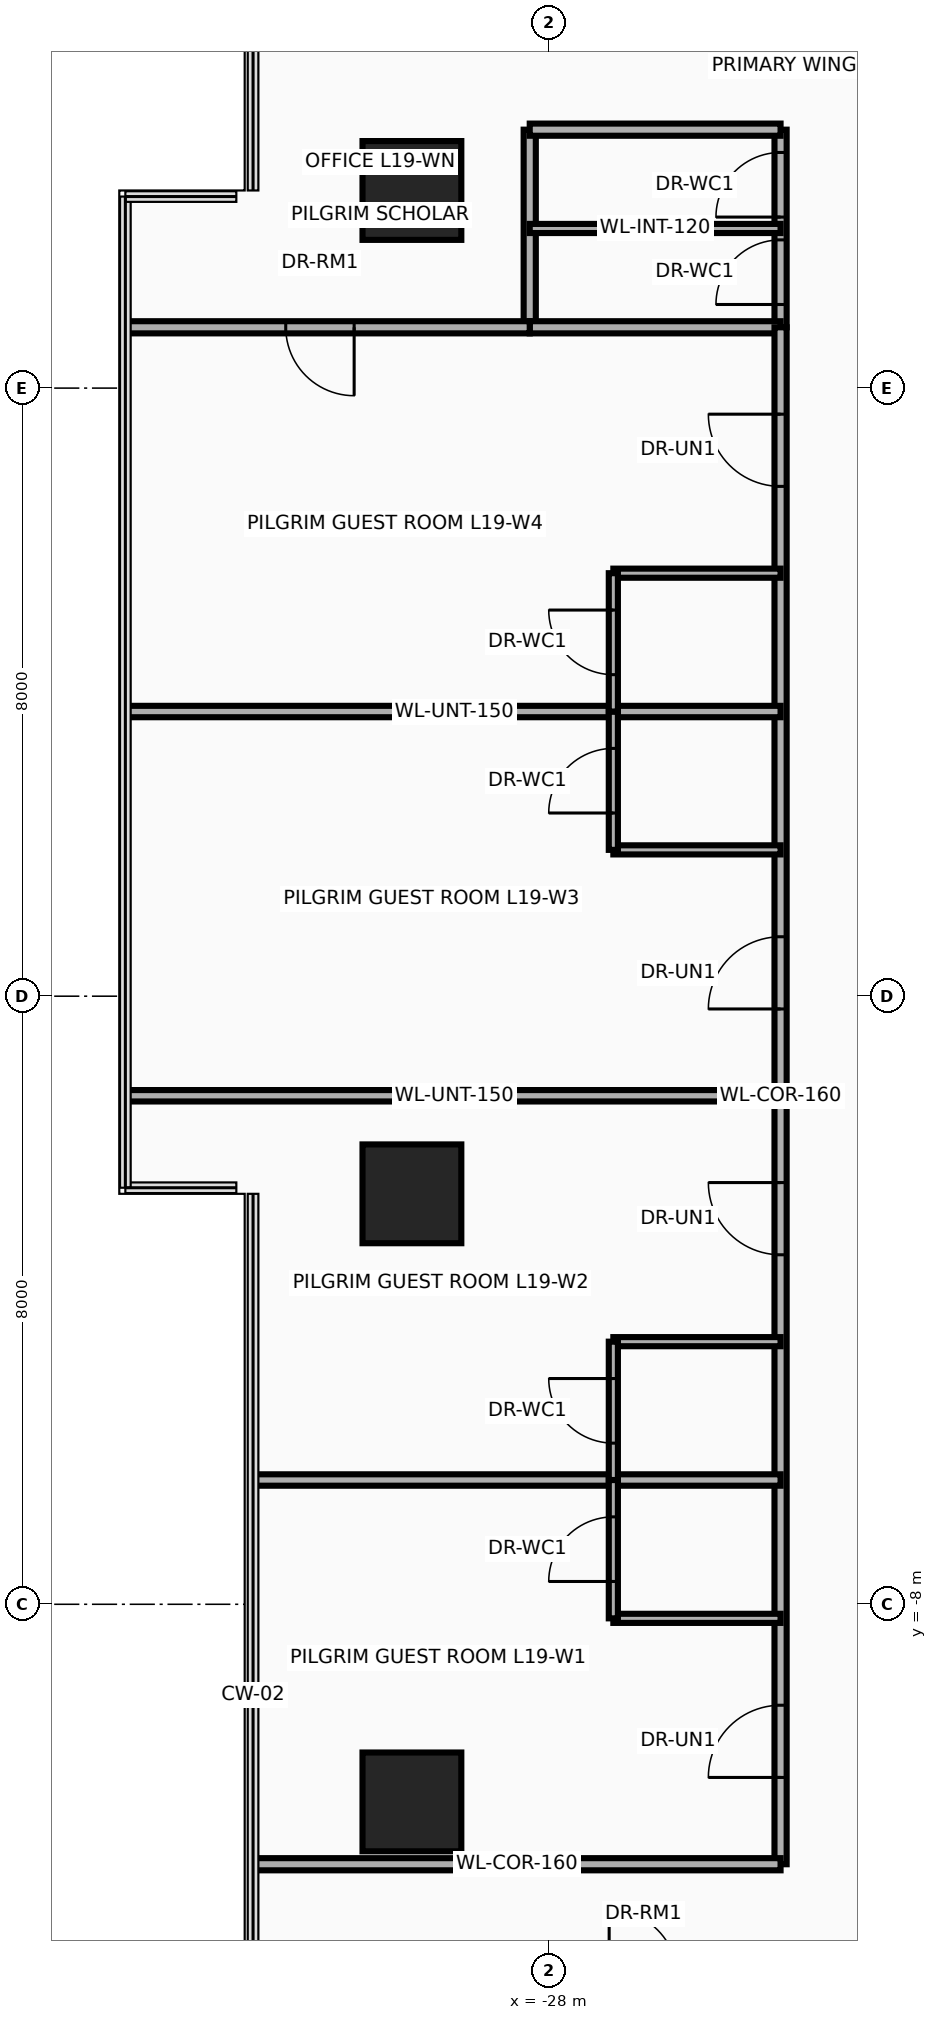
"""IFC4 building model, lengths in metres.
Left out: names, types, materials, properties, quantities, classifications, styles, units other than length and angle.
Written with IfcOpenShell. Run it as: python <this file> out.ifc"""

import sys

from ifc_helpers import new_model, si_unit, direction, frame, frame_2d, origin, origin_2d, place, context, subcontext, project, spatial, rectangle, circle, extrude, source, transform, mapped, element, fill, save


model = new_model("IFC4")
c1 = context("Model", 3, precision=1e-05, world=origin(), true_north=direction((0.0, 1.0)))
c2 = subcontext(c1, "Body", "Model", "MODEL_VIEW")
j1 = project(units=[si_unit("LENGTHUNIT", "METRE"), si_unit("PLANEANGLEUNIT", "RADIAN")], contexts=[c1])
p1 = place(None, origin())
s1 = spatial("IfcSite", under=j1, at=p1, CompositionType="ELEMENT")
p2 = place(p1, origin())
s2 = spatial("IfcBuilding", under=s1, at=p2, CompositionType="ELEMENT")
p3 = place(p2, frame((0.0, 0.0, 77.8)))
s3 = spatial("IfcBuildingStorey", under=s2, at=p3, CompositionType="ELEMENT", Elevation=77.8)
m1 = source(origin(), c2, "Body", "SweptSolid", [
    extrude(circle(Radius=0.65, at=origin_2d()), origin(), (0.0, 0.0, 1.0), 3.7),
])
for number, where, z_axis, x_axis in (
    (1, (-29.8, -10.6, 0.0), (0.0, 0.0, 1.0), (1.0, 0.0, 0.0)),
    (2, (-29.8, -2.6, 0.0), (0.0, 0.0, 1.0), (1.0, 0.0, 0.0)),
    (3, (-29.8, 10.6, 0.0), (0.0, 0.0, 1.0), (1.0, 0.0, 0.0)),
):
    element("IfcColumn", number, at=place(p3, frame(where, z_axis=z_axis, x_axis=x_axis)), inside=s3, PredefinedType="COLUMN", context=c2, shape_type="MappedRepresentation", body=[
        mapped(m1, transform((0.0, 0.0, 0.0), x_axis=(1.0, 0.0, 0.0), y_axis=(0.0, 1.0, 0.0), z_axis=(0.0, 0.0, 1.0), scale=1.0)),
    ])
p4 = place(p3, frame((-28.25, 8.8, 0.0), z_axis=(0.0, 0.0, 1.0), x_axis=(0.0, 1.0, 0.0)))
e4 = element("IfcWall", 4, at=p4, inside=s3, PredefinedType="PARTITIONING", context=c2, shape_type="SweptSolid", body=[
    extrude(rectangle(XDim=2.6, YDim=0.16, at=frame_2d((1.3, 0.0))), origin(), (0.0, 0.0, 1.0), 2.583),
])
p5 = place(p3, frame((-24.95, 8.8, 0.0), z_axis=(0.0, 0.0, 1.0), x_axis=(0.0, 1.0, 0.0)))
e5 = element("IfcWall", 5, at=p5, inside=s3, PredefinedType="PARTITIONING", context=c2, shape_type="SweptSolid", body=[
    extrude(rectangle(XDim=2.6, YDim=0.16, at=frame_2d((1.3, 0.0))), origin(), (0.0, 0.0, 1.0), 2.583),
])
p6 = place(p5, frame((0.3, 0.0, 0.0)))
e6 = element("IfcOpeningElement", 6, at=p6, cuts=e5, PredefinedType="OPENING", context=c2, shape_type="SweptSolid", body=[
    extrude(rectangle(XDim=0.85, YDim=2.1, at=frame_2d((0.425, 1.05))), frame((0.0, 0.095, 0.0), z_axis=(0.0, -1.0, 0.0), x_axis=(1.0, 0.0, 0.0)), (0.0, 0.0, 1.0), 0.19),
])
p7 = place(p5, frame((1.45, 0.0, 0.0)))
e7 = element("IfcOpeningElement", 7, at=p7, cuts=e5, PredefinedType="OPENING", context=c2, shape_type="SweptSolid", body=[
    extrude(rectangle(XDim=0.85, YDim=2.1, at=frame_2d((0.425, 1.05))), frame((0.0, 0.095, 0.0), z_axis=(0.0, -1.0, 0.0), x_axis=(1.0, 0.0, 0.0)), (0.0, 0.0, 1.0), 0.19),
])
for number, where, z_axis, x_axis in (
    (8, (-28.25, 8.8, 0.0), (0.0, 0.0, 1.0), (1.0, 0.0, 0.0)),
    (9, (-28.25, 11.4, 0.0), (0.0, 0.0, 1.0), (1.0, 0.0, 0.0)),
):
    element("IfcWall", number, at=place(p3, frame(where, z_axis=z_axis, x_axis=x_axis)), inside=s3, PredefinedType="PARTITIONING", context=c2, shape_type="SweptSolid", body=[
        extrude(rectangle(XDim=3.3, YDim=0.16, at=frame_2d((1.65, 0.0))), origin(), (0.0, 0.0, 1.0), 3.46),
    ])
p8 = place(p3, frame((-28.25, 10.1, 0.0), z_axis=(0.0, 0.0, 1.0), x_axis=(1.0, 0.0, 0.0)))
e10 = element("IfcWall", 10, at=p8, inside=s3, PredefinedType="PARTITIONING", context=c2, shape_type="SweptSolid", body=[
    extrude(rectangle(XDim=3.3, YDim=0.12, at=frame_2d((1.65, 0.0))), origin(), (0.0, 0.0, 1.0), 3.46),
])
p9 = place(p3, frame((-24.95, -11.42, 0.0), z_axis=(0.0, 0.0, 1.0), x_axis=(0.0, 1.0, 0.0)))
e11 = element("IfcWall", 11, at=p9, inside=s3, PredefinedType="PARTITIONING", context=c2, shape_type="SweptSolid", body=[
    extrude(rectangle(XDim=20.22, YDim=0.16, at=frame_2d((10.11, 0.0))), origin(), (0.0, 0.0, 1.0), 2.583),
])
p10 = place(p9, frame((1.142, 0.0, 0.0)))
e12 = element("IfcOpeningElement", 12, at=p10, cuts=e11, PredefinedType="OPENING", context=c2, shape_type="SweptSolid", body=[
    extrude(rectangle(XDim=0.95, YDim=2.15, at=frame_2d((0.475, 1.075))), frame((0.0, 0.095, 0.0), z_axis=(0.0, -1.0, 0.0), x_axis=(1.0, 0.0, 0.0)), (0.0, 0.0, 1.0), 0.19),
])
p11 = place(p9, frame((8.018, 0.0, 0.0)))
e13 = element("IfcOpeningElement", 13, at=p11, cuts=e11, PredefinedType="OPENING", context=c2, shape_type="SweptSolid", body=[
    extrude(rectangle(XDim=0.95, YDim=2.15, at=frame_2d((0.475, 1.075))), frame((0.0, 0.095, 0.0), z_axis=(0.0, -1.0, 0.0), x_axis=(1.0, 0.0, 0.0)), (0.0, 0.0, 1.0), 0.19),
])
p12 = place(p9, frame((11.252, 0.0, 0.0)))
e14 = element("IfcOpeningElement", 14, at=p12, cuts=e11, PredefinedType="OPENING", context=c2, shape_type="SweptSolid", body=[
    extrude(rectangle(XDim=0.95, YDim=2.15, at=frame_2d((0.475, 1.075))), frame((0.0, 0.095, 0.0), z_axis=(0.0, -1.0, 0.0), x_axis=(1.0, 0.0, 0.0)), (0.0, 0.0, 1.0), 0.19),
])
p13 = place(p9, frame((18.127, 0.0, 0.0)))
e15 = element("IfcOpeningElement", 15, at=p13, cuts=e11, PredefinedType="OPENING", context=c2, shape_type="SweptSolid", body=[
    extrude(rectangle(XDim=0.95, YDim=2.15, at=frame_2d((0.475, 1.075))), frame((0.0, 0.095, 0.0), z_axis=(0.0, -1.0, 0.0), x_axis=(1.0, 0.0, 0.0)), (0.0, 0.0, 1.0), 0.19),
])
p14 = place(p3, frame((-33.54, 8.8, 0.0), z_axis=(0.0, 0.0, 1.0), x_axis=(1.0, 0.0, 0.0)))
e16 = element("IfcWall", 16, at=p14, inside=s3, PredefinedType="PARTITIONING", context=c2, shape_type="SweptSolid", body=[
    extrude(rectangle(XDim=5.29, YDim=0.16, at=frame_2d((2.645, 0.0))), origin(), (0.0, 0.0, 1.0), 2.896),
])
p15 = place(p14, frame((2.08, 0.0, 0.0)))
e17 = element("IfcOpeningElement", 17, at=p15, cuts=e16, PredefinedType="OPENING", context=c2, shape_type="SweptSolid", body=[
    extrude(rectangle(XDim=0.9, YDim=2.1, at=frame_2d((0.45, 1.05))), frame((0.0, 0.095, 0.0), z_axis=(0.0, -1.0, 0.0), x_axis=(1.0, 0.0, 0.0)), (0.0, 0.0, 1.0), 0.19),
])
p16 = place(p3, frame((-31.89, -6.365, 0.0), z_axis=(0.0, 0.0, 1.0), x_axis=(1.0, 0.0, 0.0)))
e18 = element("IfcWall", 18, at=p16, inside=s3, PredefinedType="PARTITIONING", context=c2, shape_type="SweptSolid", body=[
    extrude(rectangle(XDim=6.94, YDim=0.15, at=frame_2d((3.47, 0.0))), origin(), (0.0, 0.0, 1.0), 2.896),
])
for number, where, z_axis, x_axis in (
    (19, (-33.54, -1.31, 0.0), (0.0, 0.0, 1.0), (1.0, 0.0, 0.0)),
    (20, (-33.54, 3.745, 0.0), (0.0, 0.0, 1.0), (1.0, 0.0, 0.0)),
):
    element("IfcWall", number, at=place(p3, frame(where, z_axis=z_axis, x_axis=x_axis)), inside=s3, PredefinedType="PARTITIONING", context=c2, shape_type="SweptSolid", body=[
        extrude(rectangle(XDim=8.59, YDim=0.15, at=frame_2d((4.295, 0.0))), origin(), (0.0, 0.0, 1.0), 2.896),
    ])
p17 = place(p3, frame((-27.15, -8.185, 0.0), z_axis=(0.0, 0.0, 1.0), x_axis=(1.0, 0.0, 0.0)))
e21 = element("IfcWall", 21, at=p17, inside=s3, PredefinedType="PARTITIONING", context=c2, shape_type="SweptSolid", body=[
    extrude(rectangle(XDim=2.2, YDim=0.12, at=frame_2d((1.1, 0.0))), origin(), (0.0, 0.0, 1.0), 3.46),
])
p18 = place(p3, frame((-27.15, -8.185, 0.0), z_axis=(0.0, 0.0, 1.0), x_axis=(0.0, 1.0, 0.0)))
e22 = element("IfcWall", 22, at=p18, inside=s3, PredefinedType="PARTITIONING", context=c2, shape_type="SweptSolid", body=[
    extrude(rectangle(XDim=1.82, YDim=0.12, at=frame_2d((0.91, 0.0))), origin(), (0.0, 0.0, 1.0), 2.979),
])
p19 = place(p18, frame((0.485, 0.0, 0.0)))
e23 = element("IfcOpeningElement", 23, at=p19, cuts=e22, PredefinedType="OPENING", context=c2, shape_type="SweptSolid", body=[
    extrude(rectangle(XDim=0.85, YDim=2.1, at=frame_2d((0.425, 1.05))), frame((0.0, 0.075, 0.0), z_axis=(0.0, -1.0, 0.0), x_axis=(1.0, 0.0, 0.0)), (0.0, 0.0, 1.0), 0.15),
])
p20 = place(p3, frame((-27.15, -4.545, 0.0), z_axis=(0.0, 0.0, 1.0), x_axis=(1.0, 0.0, 0.0)))
e24 = element("IfcWall", 24, at=p20, inside=s3, PredefinedType="PARTITIONING", context=c2, shape_type="SweptSolid", body=[
    extrude(rectangle(XDim=2.2, YDim=0.12, at=frame_2d((1.1, 0.0))), origin(), (0.0, 0.0, 1.0), 2.979),
])
p21 = place(p3, frame((-27.15, -6.365, 0.0), z_axis=(0.0, 0.0, 1.0), x_axis=(0.0, 1.0, 0.0)))
e25 = element("IfcWall", 25, at=p21, inside=s3, PredefinedType="PARTITIONING", context=c2, shape_type="SweptSolid", body=[
    extrude(rectangle(XDim=1.82, YDim=0.12, at=frame_2d((0.91, 0.0))), origin(), (0.0, 0.0, 1.0), 2.979),
])
p22 = place(p21, frame((0.485, 0.0, 0.0)))
e26 = element("IfcOpeningElement", 26, at=p22, cuts=e25, PredefinedType="OPENING", context=c2, shape_type="SweptSolid", body=[
    extrude(rectangle(XDim=0.85, YDim=2.1, at=frame_2d((0.425, 1.05))), frame((0.0, 0.075, 0.0), z_axis=(0.0, -1.0, 0.0), x_axis=(1.0, 0.0, 0.0)), (0.0, 0.0, 1.0), 0.15),
])
p23 = place(p3, frame((-27.15, 1.925, 0.0), z_axis=(0.0, 0.0, 1.0), x_axis=(1.0, 0.0, 0.0)))
e27 = element("IfcWall", 27, at=p23, inside=s3, PredefinedType="PARTITIONING", context=c2, shape_type="SweptSolid", body=[
    extrude(rectangle(XDim=2.2, YDim=0.12, at=frame_2d((1.1, 0.0))), origin(), (0.0, 0.0, 1.0), 3.46),
])
p24 = place(p3, frame((-27.15, 1.925, 0.0), z_axis=(0.0, 0.0, 1.0), x_axis=(0.0, 1.0, 0.0)))
e28 = element("IfcWall", 28, at=p24, inside=s3, PredefinedType="PARTITIONING", context=c2, shape_type="SweptSolid", body=[
    extrude(rectangle(XDim=1.82, YDim=0.12, at=frame_2d((0.91, 0.0))), origin(), (0.0, 0.0, 1.0), 2.979),
])
p25 = place(p24, frame((0.485, 0.0, 0.0)))
e29 = element("IfcOpeningElement", 29, at=p25, cuts=e28, PredefinedType="OPENING", context=c2, shape_type="SweptSolid", body=[
    extrude(rectangle(XDim=0.85, YDim=2.1, at=frame_2d((0.425, 1.05))), frame((0.0, 0.075, 0.0), z_axis=(0.0, -1.0, 0.0), x_axis=(1.0, 0.0, 0.0)), (0.0, 0.0, 1.0), 0.15),
])
p26 = place(p3, frame((-27.15, 5.565, 0.0), z_axis=(0.0, 0.0, 1.0), x_axis=(1.0, 0.0, 0.0)))
e30 = element("IfcWall", 30, at=p26, inside=s3, PredefinedType="PARTITIONING", context=c2, shape_type="SweptSolid", body=[
    extrude(rectangle(XDim=2.2, YDim=0.12, at=frame_2d((1.1, 0.0))), origin(), (0.0, 0.0, 1.0), 3.46),
])
p27 = place(p3, frame((-27.15, 3.745, 0.0), z_axis=(0.0, 0.0, 1.0), x_axis=(0.0, 1.0, 0.0)))
e31 = element("IfcWall", 31, at=p27, inside=s3, PredefinedType="PARTITIONING", context=c2, shape_type="SweptSolid", body=[
    extrude(rectangle(XDim=1.82, YDim=0.12, at=frame_2d((0.91, 0.0))), origin(), (0.0, 0.0, 1.0), 2.979),
])
p28 = place(p27, frame((0.485, 0.0, 0.0)))
e32 = element("IfcOpeningElement", 32, at=p28, cuts=e31, PredefinedType="OPENING", context=c2, shape_type="SweptSolid", body=[
    extrude(rectangle(XDim=0.85, YDim=2.1, at=frame_2d((0.425, 1.05))), frame((0.0, 0.075, 0.0), z_axis=(0.0, -1.0, 0.0), x_axis=(1.0, 0.0, 0.0)), (0.0, 0.0, 1.0), 0.15),
])
p29 = place(p3, frame((-31.89, -11.42, 0.0), z_axis=(0.0, 0.0, 1.0), x_axis=(1.0, 0.0, 0.0)))
e33 = element("IfcWall", 33, at=p29, inside=s3, PredefinedType="PARTITIONING", context=c2, shape_type="SweptSolid", body=[
    extrude(rectangle(XDim=6.94, YDim=0.16, at=frame_2d((3.47, 0.0))), origin(), (0.0, 0.0, 1.0), 3.46),
])
p30 = place(p6, origin())
e34 = element("IfcDoor", 34, at=p30, inside=s3, OperationType="SINGLE_SWING_LEFT", PredefinedType="DOOR", context=c2, shape_type="SweptSolid", body=[
    extrude(rectangle(XDim=0.85, YDim=2.1, at=frame_2d((0.425, 1.05))), frame((0.0, 0.025, 0.0), z_axis=(0.0, -1.0, 0.0), x_axis=(1.0, 0.0, 0.0)), (0.0, 0.0, 1.0), 0.05),
])
fill(e6, e34)
p31 = place(p7, origin())
e35 = element("IfcDoor", 35, at=p31, inside=s3, OperationType="SINGLE_SWING_RIGHT", PredefinedType="DOOR", context=c2, shape_type="SweptSolid", body=[
    extrude(rectangle(XDim=0.85, YDim=2.1, at=frame_2d((0.425, 1.05))), frame((0.0, 0.025, 0.0), z_axis=(0.0, -1.0, 0.0), x_axis=(1.0, 0.0, 0.0)), (0.0, 0.0, 1.0), 0.05),
])
fill(e7, e35)
p32 = place(p15, frame((0.9, 0.0, 0.0), z_axis=(0.0, 0.0, 1.0), x_axis=(-1.0, 0.0, 0.0)))
e36 = element("IfcDoor", 36, at=p32, inside=s3, OperationType="SINGLE_SWING_LEFT", PredefinedType="DOOR", context=c2, shape_type="SweptSolid", body=[
    extrude(rectangle(XDim=0.9, YDim=2.1, at=frame_2d((0.45, 1.05))), frame((0.0, 0.025, 0.0), z_axis=(0.0, -1.0, 0.0), x_axis=(1.0, 0.0, 0.0)), (0.0, 0.0, 1.0), 0.05),
])
fill(e17, e36)
p33 = place(p10, origin())
e37 = element("IfcDoor", 37, at=p33, inside=s3, OperationType="SINGLE_SWING_RIGHT", PredefinedType="DOOR", context=c2, shape_type="SweptSolid", body=[
    extrude(rectangle(XDim=0.95, YDim=2.15, at=frame_2d((0.475, 1.075))), frame((0.0, 0.025, 0.0), z_axis=(0.0, -1.0, 0.0), x_axis=(1.0, 0.0, 0.0)), (0.0, 0.0, 1.0), 0.05),
])
fill(e12, e37)
p34 = place(p19, origin())
e38 = element("IfcDoor", 38, at=p34, inside=s3, OperationType="SINGLE_SWING_LEFT", PredefinedType="DOOR", context=c2, shape_type="SweptSolid", body=[
    extrude(rectangle(XDim=0.85, YDim=2.1, at=frame_2d((0.425, 1.05))), frame((0.0, 0.025, 0.0), z_axis=(0.0, -1.0, 0.0), x_axis=(1.0, 0.0, 0.0)), (0.0, 0.0, 1.0), 0.05),
])
fill(e23, e38)
p35 = place(p11, origin())
e39 = element("IfcDoor", 39, at=p35, inside=s3, OperationType="SINGLE_SWING_RIGHT", PredefinedType="DOOR", context=c2, shape_type="SweptSolid", body=[
    extrude(rectangle(XDim=0.95, YDim=2.15, at=frame_2d((0.475, 1.075))), frame((0.0, 0.025, 0.0), z_axis=(0.0, -1.0, 0.0), x_axis=(1.0, 0.0, 0.0)), (0.0, 0.0, 1.0), 0.05),
])
fill(e13, e39)
p36 = place(p22, origin())
e40 = element("IfcDoor", 40, at=p36, inside=s3, OperationType="SINGLE_SWING_LEFT", PredefinedType="DOOR", context=c2, shape_type="SweptSolid", body=[
    extrude(rectangle(XDim=0.85, YDim=2.1, at=frame_2d((0.425, 1.05))), frame((0.0, 0.025, 0.0), z_axis=(0.0, -1.0, 0.0), x_axis=(1.0, 0.0, 0.0)), (0.0, 0.0, 1.0), 0.05),
])
fill(e26, e40)
p37 = place(p12, origin())
e41 = element("IfcDoor", 41, at=p37, inside=s3, OperationType="SINGLE_SWING_RIGHT", PredefinedType="DOOR", context=c2, shape_type="SweptSolid", body=[
    extrude(rectangle(XDim=0.95, YDim=2.15, at=frame_2d((0.475, 1.075))), frame((0.0, 0.025, 0.0), z_axis=(0.0, -1.0, 0.0), x_axis=(1.0, 0.0, 0.0)), (0.0, 0.0, 1.0), 0.05),
])
fill(e14, e41)
p38 = place(p25, origin())
e42 = element("IfcDoor", 42, at=p38, inside=s3, OperationType="SINGLE_SWING_LEFT", PredefinedType="DOOR", context=c2, shape_type="SweptSolid", body=[
    extrude(rectangle(XDim=0.85, YDim=2.1, at=frame_2d((0.425, 1.05))), frame((0.0, 0.025, 0.0), z_axis=(0.0, -1.0, 0.0), x_axis=(1.0, 0.0, 0.0)), (0.0, 0.0, 1.0), 0.05),
])
fill(e29, e42)
p39 = place(p13, origin())
e43 = element("IfcDoor", 43, at=p39, inside=s3, OperationType="SINGLE_SWING_RIGHT", PredefinedType="DOOR", context=c2, shape_type="SweptSolid", body=[
    extrude(rectangle(XDim=0.95, YDim=2.15, at=frame_2d((0.475, 1.075))), frame((0.0, 0.025, 0.0), z_axis=(0.0, -1.0, 0.0), x_axis=(1.0, 0.0, 0.0)), (0.0, 0.0, 1.0), 0.05),
])
fill(e15, e43)
p40 = place(p28, origin())
e44 = element("IfcDoor", 44, at=p40, inside=s3, OperationType="SINGLE_SWING_LEFT", PredefinedType="DOOR", context=c2, shape_type="SweptSolid", body=[
    extrude(rectangle(XDim=0.85, YDim=2.1, at=frame_2d((0.425, 1.05))), frame((0.0, 0.025, 0.0), z_axis=(0.0, -1.0, 0.0), x_axis=(1.0, 0.0, 0.0)), (0.0, 0.0, 1.0), 0.05),
])
fill(e32, e44)
save(model, sys.argv[1])
